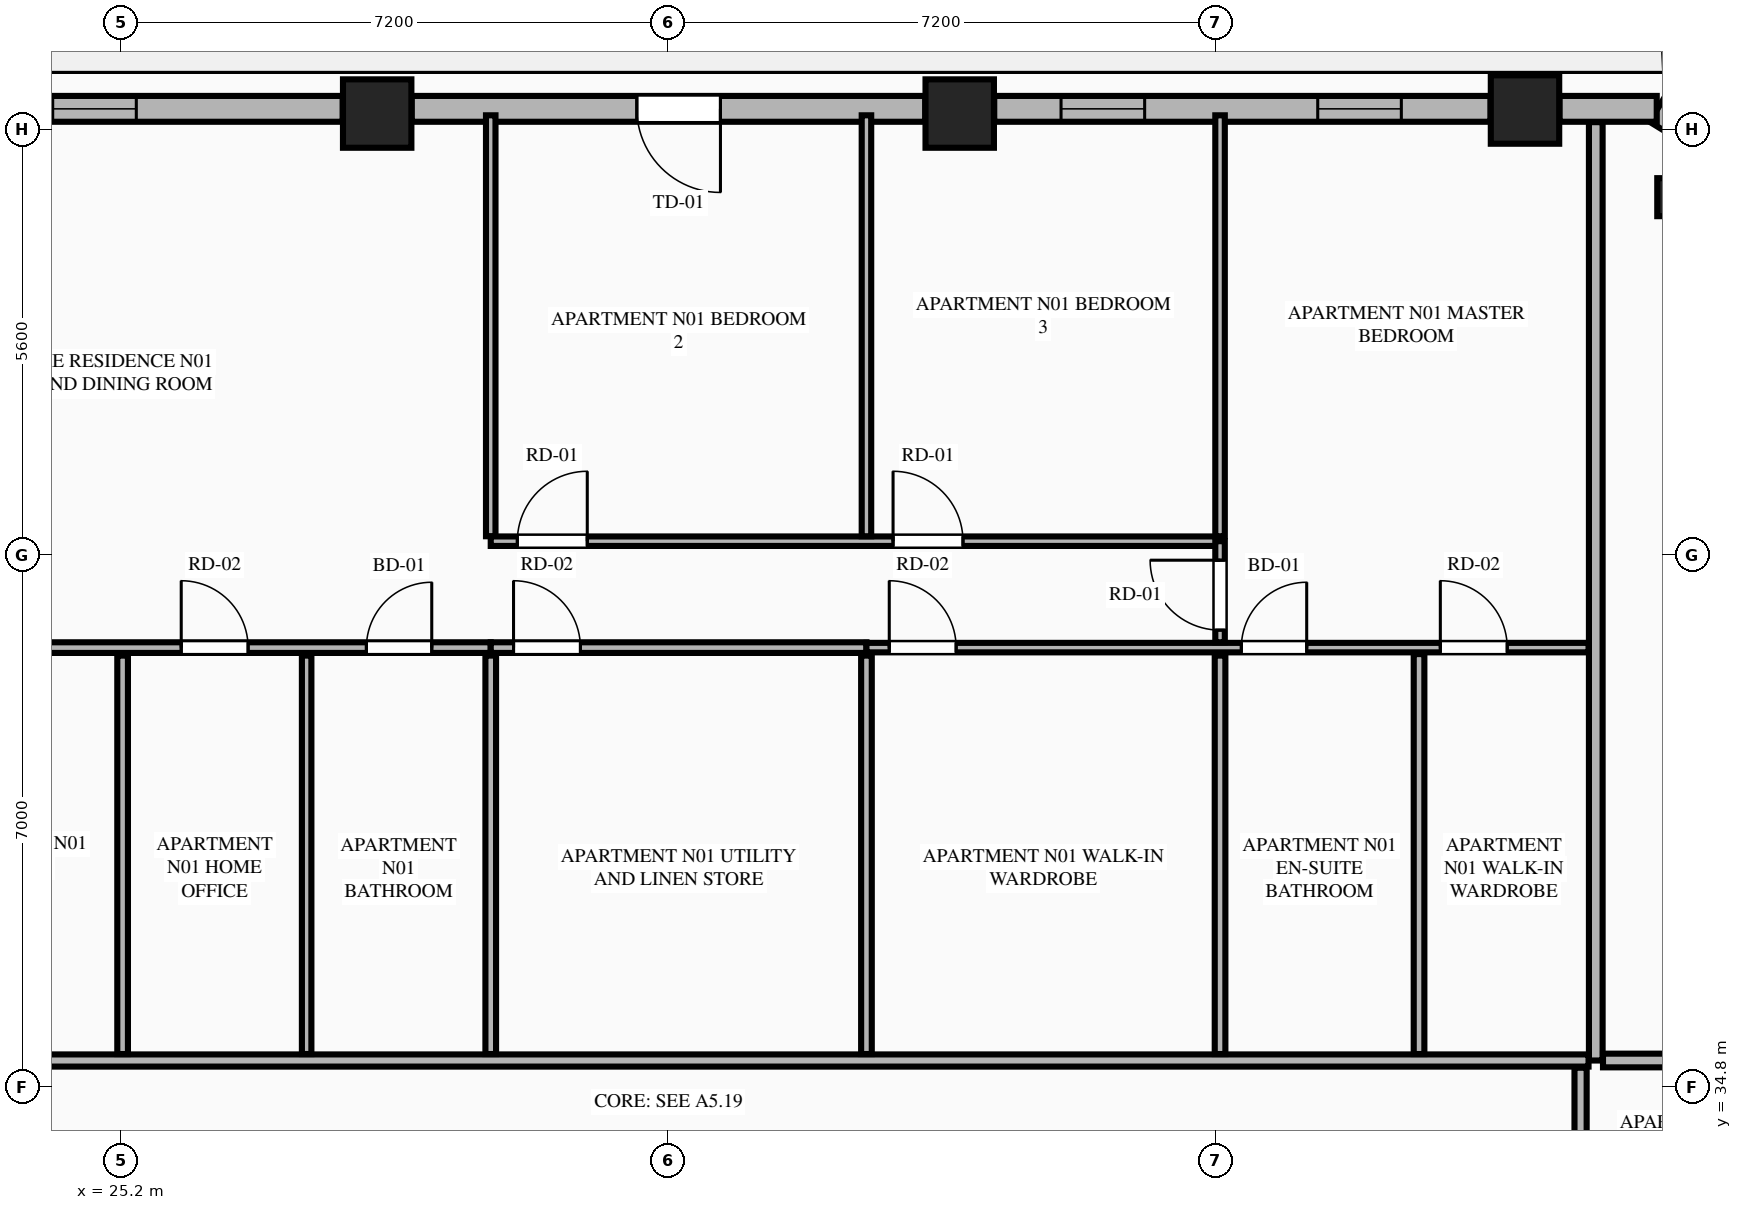
"""IFC4 building model, lengths in metres.
Left out: names, types, materials, properties, quantities, classifications, styles, units other than length and angle.
Written with IfcOpenShell. Run it as: python <this file> out.ifc"""

import sys

from ifc_helpers import new_model, si_unit, direction, frame, frame_2d, origin, origin_2d, place, context, subcontext, project, spatial, rectangle, extrude, element, fill, save


model = new_model("IFC4")
c1 = context("Model", 3, precision=1e-05, world=origin(), true_north=direction((0.0, 1.0)))
c2 = subcontext(c1, "Body", "Model", "MODEL_VIEW")
j1 = project(units=[si_unit("LENGTHUNIT", "METRE"), si_unit("PLANEANGLEUNIT", "RADIAN")], contexts=[c1])
p1 = place(None, origin())
s1 = spatial("IfcSite", under=j1, at=p1, CompositionType="ELEMENT")
p2 = place(p1, origin())
s2 = spatial("IfcBuilding", under=s1, at=p2, CompositionType="ELEMENT")
p3 = place(p2, frame((0.0, 0.0, 164.15)))
s3 = spatial("IfcBuildingStorey", under=s2, at=p3, CompositionType="ELEMENT", Elevation=164.15)
for number, where, z_axis, x_axis in (
    (1, (43.669, 47.661, 0.0), (0.0, 0.0, 1.0), (1.0, 0.0, 0.0)),
    (2, (36.232, 47.608, 0.0), (0.0, 0.0, 1.0), (1.0, 0.0, 0.0)),
    (3, (28.568, 47.608, 0.0), (0.0, 0.0, 1.0), (1.0, 0.0, 0.0)),
):
    element("IfcColumn", number, at=place(p3, frame(where, z_axis=z_axis, x_axis=x_axis)), inside=s3, PredefinedType="COLUMN", context=c2, shape_type="SweptSolid", body=[
        extrude(rectangle(XDim=0.9, YDim=0.9, at=origin_2d()), origin(), (0.0, 0.0, 1.0), 3.55),
    ])
p4 = place(p3, frame((45.659, 46.508, 0.0), z_axis=(0.0, 0.0, 1.0), x_axis=(-0.865160173452, 0.501495637342, 0.0)))
e4 = element("IfcColumn", 4, at=p4, inside=s3, PredefinedType="PILASTER", context=c2, shape_type="SweptSolid", body=[
    extrude(rectangle(XDim=0.5, YDim=0.35, at=origin_2d()), origin(), (0.0, 0.0, 1.0), 3.55),
])
p5 = place(p3, frame((46.971, 46.677, 0.0), z_axis=(0.0, 0.0, 1.0), x_axis=(-0.851798915137, 0.523868884523, 0.0)))
e5 = element("IfcWall", 5, at=p5, inside=s3, PredefinedType="STANDARD", context=c2, shape_type="SweptSolid", body=[
    extrude(rectangle(XDim=1.848, YDim=0.34, at=frame_2d((0.924, 0.0))), origin(), (0.0, 0.0, 1.0), 3.34),
])
p6 = place(p3, frame((45.402, 47.67, 0.0), z_axis=(0.0, 0.0, 1.0), x_axis=(-1.0, 0.0, 0.0)))
e6 = element("IfcWall", 6, at=p6, inside=s3, PredefinedType="STANDARD", context=c2, shape_type="SweptSolid", body=[
    extrude(rectangle(XDim=1.279, YDim=0.34, at=frame_2d((0.64, 0.0))), origin(), (0.0, 0.0, 1.0), 3.34),
])
p7 = place(p3, frame((43.215, 47.67, 0.0), z_axis=(0.0, 0.0, 1.0), x_axis=(-1.0, 0.0, 0.0)))
e7 = element("IfcWall", 7, at=p7, inside=s3, PredefinedType="STANDARD", context=c2, shape_type="SweptSolid", body=[
    extrude(rectangle(XDim=6.529, YDim=0.34, at=frame_2d((3.265, 0.0))), origin(), (0.0, 0.0, 1.0), 2.797),
])
p8 = place(p7, frame((1.173, 0.0, 0.75)))
e8 = element("IfcOpeningElement", 8, at=p8, cuts=e7, PredefinedType="OPENING", context=c2, shape_type="SweptSolid", body=[
    extrude(rectangle(XDim=1.1, YDim=1.897, at=frame_2d((0.55, 0.948))), frame((0.0, 0.18, 0.0), z_axis=(0.0, -1.0, 0.0), x_axis=(1.0, 0.0, 0.0)), (0.0, 0.0, 1.0), 0.36),
])
p9 = place(p7, frame((4.55, 0.0, 0.75)))
e9 = element("IfcOpeningElement", 9, at=p9, cuts=e7, PredefinedType="OPENING", context=c2, shape_type="SweptSolid", body=[
    extrude(rectangle(XDim=1.1, YDim=1.897, at=frame_2d((0.55, 0.948))), frame((0.0, 0.18, 0.0), z_axis=(0.0, -1.0, 0.0), x_axis=(1.0, 0.0, 0.0)), (0.0, 0.0, 1.0), 0.36),
])
p10 = place(p3, frame((35.778, 47.67, 0.0), z_axis=(0.0, 0.0, 1.0), x_axis=(-1.0, 0.0, 0.0)))
e10 = element("IfcWall", 10, at=p10, inside=s3, PredefinedType="STANDARD", context=c2, shape_type="SweptSolid", body=[
    extrude(rectangle(XDim=6.756, YDim=0.34, at=frame_2d((3.378, 0.0))), origin(), (0.0, 0.0, 1.0), 2.797),
])
p11 = place(p10, frame((2.694, 0.0, 0.0)))
e11 = element("IfcOpeningElement", 11, at=p11, cuts=e10, PredefinedType="OPENING", context=c2, shape_type="SweptSolid", body=[
    extrude(rectangle(XDim=1.1, YDim=2.25, at=frame_2d((0.55, 1.125))), frame((0.0, 0.18, 0.0), z_axis=(0.0, -1.0, 0.0), x_axis=(1.0, 0.0, 0.0)), (0.0, 0.0, 1.0), 0.36),
])
p12 = place(p3, frame((28.114, 47.67, 0.0), z_axis=(0.0, 0.0, 1.0), x_axis=(-1.0, 0.0, 0.0)))
e12 = element("IfcWall", 12, at=p12, inside=s3, PredefinedType="STANDARD", context=c2, shape_type="SweptSolid", body=[
    extrude(rectangle(XDim=6.529, YDim=0.34, at=frame_2d((3.265, 0.0))), origin(), (0.0, 0.0, 1.0), 2.797),
])
p13 = place(p12, frame((2.715, 0.0, 0.75)))
e13 = element("IfcOpeningElement", 13, at=p13, cuts=e12, PredefinedType="OPENING", context=c2, shape_type="SweptSolid", body=[
    extrude(rectangle(XDim=1.1, YDim=1.897, at=frame_2d((0.55, 0.948))), frame((0.0, 0.18, 0.0), z_axis=(0.0, -1.0, 0.0), x_axis=(1.0, 0.0, 0.0)), (0.0, 0.0, 1.0), 0.36),
])
p14 = place(p3, frame((44.6, 35.15, 0.0), z_axis=(0.0, 0.0, 1.0), x_axis=(0.0, 1.0, 0.0)))
e14 = element("IfcWall", 14, at=p14, inside=s3, PredefinedType="PARTITIONING", context=c2, shape_type="SweptSolid", body=[
    extrude(rectangle(XDim=12.345, YDim=0.18, at=frame_2d((6.173, 0.0))), origin(), (0.0, 0.0, 1.0), 3.34),
])
p15 = place(p3, frame((20.295, 35.15, 0.0), z_axis=(0.0, 0.0, 1.0), x_axis=(1.0, 0.0, 0.0)))
e15 = element("IfcWall", 15, at=p15, inside=s3, PredefinedType="PARTITIONING", context=c2, shape_type="SweptSolid", body=[
    extrude(rectangle(XDim=24.21, YDim=0.16, at=frame_2d((12.105, 0.0))), origin(), (0.0, 0.0, 1.0), 3.34),
])
p16 = place(p15, frame((0.405, 0.0, 0.0)))
e16 = element("IfcOpeningElement", 16, at=p16, cuts=e15, PredefinedType="OPENING", context=c2, shape_type="SweptSolid", body=[
    extrude(rectangle(XDim=1.35, YDim=2.35, at=frame_2d((0.675, 1.175))), frame((0.0, 0.09, 0.0), z_axis=(0.0, -1.0, 0.0), x_axis=(1.0, 0.0, 0.0)), (0.0, 0.0, 1.0), 0.18),
])
p17 = place(p3, frame((22.25, 40.582, 0.0), z_axis=(0.0, 0.0, 1.0), x_axis=(1.0, 0.0, 0.0)))
e17 = element("IfcWall", 17, at=p17, inside=s3, PredefinedType="PLUMBINGWALL", context=c2, shape_type="SweptSolid", body=[
    extrude(rectangle(XDim=7.812, YDim=0.14, at=frame_2d((3.906, 0.0))), origin(), (0.0, 0.0, 1.0), 3.34),
])
p18 = place(p17, frame((6.176, 0.0, 0.0)))
e18 = element("IfcOpeningElement", 18, at=p18, cuts=e17, PredefinedType="OPENING", context=c2, shape_type="SweptSolid", body=[
    extrude(rectangle(XDim=0.86, YDim=2.1, at=frame_2d((0.43, 1.05))), frame((0.0, 0.08, 0.0), z_axis=(0.0, -1.0, 0.0), x_axis=(1.0, 0.0, 0.0)), (0.0, 0.0, 1.0), 0.16),
])
p19 = place(p17, frame((0.26, 0.0, 0.0)))
e19 = element("IfcOpeningElement", 19, at=p19, cuts=e17, PredefinedType="OPENING", context=c2, shape_type="SweptSolid", body=[
    extrude(rectangle(XDim=0.88, YDim=2.15, at=frame_2d((0.44, 1.075))), frame((0.0, 0.08, 0.0), z_axis=(0.0, -1.0, 0.0), x_axis=(1.0, 0.0, 0.0)), (0.0, 0.0, 1.0), 0.16),
])
p20 = place(p17, frame((3.74, 0.0, 0.0)))
e20 = element("IfcOpeningElement", 20, at=p20, cuts=e17, PredefinedType="OPENING", context=c2, shape_type="SweptSolid", body=[
    extrude(rectangle(XDim=0.88, YDim=2.15, at=frame_2d((0.44, 1.075))), frame((0.0, 0.08, 0.0), z_axis=(0.0, -1.0, 0.0), x_axis=(1.0, 0.0, 0.0)), (0.0, 0.0, 1.0), 0.16),
])
p21 = place(p3, frame((30.062, 40.582, 0.0), z_axis=(0.0, 0.0, 1.0), x_axis=(1.0, 0.0, 0.0)))
e21 = element("IfcWall", 21, at=p21, inside=s3, PredefinedType="PLUMBINGWALL", context=c2, shape_type="SweptSolid", body=[
    extrude(rectangle(XDim=4.943, YDim=0.14, at=frame_2d((2.471, 0.0))), origin(), (0.0, 0.0, 1.0), 3.34),
])
p22 = place(p21, frame((0.3, 0.0, 0.0)))
e22 = element("IfcOpeningElement", 22, at=p22, cuts=e21, PredefinedType="OPENING", context=c2, shape_type="SweptSolid", body=[
    extrude(rectangle(XDim=0.88, YDim=2.15, at=frame_2d((0.44, 1.075))), frame((0.0, 0.08, 0.0), z_axis=(0.0, -1.0, 0.0), x_axis=(1.0, 0.0, 0.0)), (0.0, 0.0, 1.0), 0.16),
])
p23 = place(p3, frame((35.005, 40.582, 0.0), z_axis=(0.0, 0.0, 1.0), x_axis=(1.0, 0.0, 0.0)))
e23 = element("IfcWall", 23, at=p23, inside=s3, PredefinedType="PARTITIONING", context=c2, shape_type="SweptSolid", body=[
    extrude(rectangle(XDim=9.5, YDim=0.125, at=frame_2d((4.75, 0.0))), origin(), (0.0, 0.0, 1.0), 3.34),
])
p24 = place(p23, frame((4.932, 0.0, 0.0)))
e24 = element("IfcOpeningElement", 24, at=p24, cuts=e23, PredefinedType="OPENING", context=c2, shape_type="SweptSolid", body=[
    extrude(rectangle(XDim=0.86, YDim=2.1, at=frame_2d((0.43, 1.05))), frame((0.0, 0.073, 0.0), z_axis=(0.0, -1.0, 0.0), x_axis=(1.0, 0.0, 0.0)), (0.0, 0.0, 1.0), 0.145),
])
p25 = place(p23, frame((7.55, 0.0, 0.0)))
e25 = element("IfcOpeningElement", 25, at=p25, cuts=e23, PredefinedType="OPENING", context=c2, shape_type="SweptSolid", body=[
    extrude(rectangle(XDim=0.88, YDim=2.15, at=frame_2d((0.44, 1.075))), frame((0.0, 0.073, 0.0), z_axis=(0.0, -1.0, 0.0), x_axis=(1.0, 0.0, 0.0)), (0.0, 0.0, 1.0), 0.145),
])
p26 = place(p23, frame((0.3, 0.0, 0.0)))
e26 = element("IfcOpeningElement", 26, at=p26, cuts=e23, PredefinedType="OPENING", context=c2, shape_type="SweptSolid", body=[
    extrude(rectangle(XDim=0.88, YDim=2.15, at=frame_2d((0.44, 1.075))), frame((0.0, 0.073, 0.0), z_axis=(0.0, -1.0, 0.0), x_axis=(1.0, 0.0, 0.0)), (0.0, 0.0, 1.0), 0.145),
])
p27 = place(p3, frame((25.219, 35.235, 0.0), z_axis=(0.0, 0.0, 1.0), x_axis=(0.0, 1.0, 0.0)))
e27 = element("IfcWall", 27, at=p27, inside=s3, PredefinedType="PLUMBINGWALL", context=c2, shape_type="SweptSolid", body=[
    extrude(rectangle(XDim=5.242, YDim=0.14, at=frame_2d((2.621, 0.0))), origin(), (0.0, 0.0, 1.0), 3.34),
])
p28 = place(p3, frame((27.64, 35.235, 0.0), z_axis=(0.0, 0.0, 1.0), x_axis=(0.0, 1.0, 0.0)))
e28 = element("IfcWall", 28, at=p28, inside=s3, PredefinedType="PARTITIONING", context=c2, shape_type="SweptSolid", body=[
    extrude(rectangle(XDim=5.242, YDim=0.125, at=frame_2d((2.621, 0.0))), origin(), (0.0, 0.0, 1.0), 3.34),
])
p29 = place(p3, frame((30.062, 42.047, 0.0), z_axis=(0.0, 0.0, 1.0), x_axis=(0.0, 1.0, 0.0)))
e29 = element("IfcWall", 29, at=p29, inside=s3, PredefinedType="PARTITIONING", context=c2, shape_type="SweptSolid", body=[
    extrude(rectangle(XDim=5.538, YDim=0.125, at=frame_2d((2.769, 0.0))), origin(), (0.0, 0.0, 1.0), 3.34),
])
p30 = place(p3, frame((30.062, 41.982, 0.0), z_axis=(0.0, 0.0, 1.0), x_axis=(1.0, 0.0, 0.0)))
e30 = element("IfcWall", 30, at=p30, inside=s3, PredefinedType="PARTITIONING", context=c2, shape_type="SweptSolid", body=[
    extrude(rectangle(XDim=9.595, YDim=0.125, at=frame_2d((4.797, 0.0))), origin(), (0.0, 0.0, 1.0), 3.34),
])
p31 = place(p30, frame((0.35, 0.0, 0.0)))
e31 = element("IfcOpeningElement", 31, at=p31, cuts=e30, PredefinedType="OPENING", context=c2, shape_type="SweptSolid", body=[
    extrude(rectangle(XDim=0.92, YDim=2.15, at=frame_2d((0.46, 1.075))), frame((0.0, 0.073, 0.0), z_axis=(0.0, -1.0, 0.0), x_axis=(1.0, 0.0, 0.0)), (0.0, 0.0, 1.0), 0.145),
])
p32 = place(p30, frame((5.293, 0.0, 0.0)))
e32 = element("IfcOpeningElement", 32, at=p32, cuts=e30, PredefinedType="OPENING", context=c2, shape_type="SweptSolid", body=[
    extrude(rectangle(XDim=0.92, YDim=2.15, at=frame_2d((0.46, 1.075))), frame((0.0, 0.073, 0.0), z_axis=(0.0, -1.0, 0.0), x_axis=(1.0, 0.0, 0.0)), (0.0, 0.0, 1.0), 0.145),
])
p33 = place(p3, frame((39.657, 40.652, 0.0), z_axis=(0.0, 0.0, 1.0), x_axis=(0.0, 1.0, 0.0)))
e33 = element("IfcWall", 33, at=p33, inside=s3, PredefinedType="PARTITIONING", context=c2, shape_type="SweptSolid", body=[
    extrude(rectangle(XDim=1.33, YDim=0.125, at=frame_2d((0.665, 0.0))), origin(), (0.0, 0.0, 1.0), 3.34),
])
p34 = place(p33, frame((0.16, 0.0, 0.0)))
e34 = element("IfcOpeningElement", 34, at=p34, cuts=e33, PredefinedType="OPENING", context=c2, shape_type="SweptSolid", body=[
    extrude(rectangle(XDim=0.92, YDim=2.15, at=frame_2d((0.46, 1.075))), frame((0.0, 0.073, 0.0), z_axis=(0.0, -1.0, 0.0), x_axis=(1.0, 0.0, 0.0)), (0.0, 0.0, 1.0), 0.145),
])
for number, where, z_axis, x_axis in (
    (35, (30.062, 35.235, 0.0), (0.0, 0.0, 1.0), (0.0, 1.0, 0.0)),
    (36, (35.005, 35.235, 0.0), (0.0, 0.0, 1.0), (0.0, 1.0, 0.0)),
):
    element("IfcWall", number, at=place(p3, frame(where, z_axis=z_axis, x_axis=x_axis)), inside=s3, PredefinedType="PLUMBINGWALL", context=c2, shape_type="SweptSolid", body=[
        extrude(rectangle(XDim=5.242, YDim=0.14, at=frame_2d((2.621, 0.0))), origin(), (0.0, 0.0, 1.0), 3.34),
    ])
for number, where, z_axis, x_axis in (
    (37, (35.005, 42.047, 0.0), (0.0, 0.0, 1.0), (0.0, 1.0, 0.0)),
    (38, (39.657, 42.047, 0.0), (0.0, 0.0, 1.0), (0.0, 1.0, 0.0)),
):
    element("IfcWall", number, at=place(p3, frame(where, z_axis=z_axis, x_axis=x_axis)), inside=s3, PredefinedType="PARTITIONING", context=c2, shape_type="SweptSolid", body=[
        extrude(rectangle(XDim=5.538, YDim=0.125, at=frame_2d((2.769, 0.0))), origin(), (0.0, 0.0, 1.0), 3.34),
    ])
p35 = place(p3, frame((39.657, 35.235, 0.0), z_axis=(0.0, 0.0, 1.0), x_axis=(0.0, 1.0, 0.0)))
e39 = element("IfcWall", 39, at=p35, inside=s3, PredefinedType="PLUMBINGWALL", context=c2, shape_type="SweptSolid", body=[
    extrude(rectangle(XDim=5.242, YDim=0.14, at=frame_2d((2.621, 0.0))), origin(), (0.0, 0.0, 1.0), 3.34),
])
p36 = place(p3, frame((42.275, 35.235, 0.0), z_axis=(0.0, 0.0, 1.0), x_axis=(0.0, 1.0, 0.0)))
e40 = element("IfcWall", 40, at=p36, inside=s3, PredefinedType="PLUMBINGWALL", context=c2, shape_type="SweptSolid", body=[
    extrude(rectangle(XDim=5.262, YDim=0.14, at=frame_2d((2.631, 0.0))), origin(), (0.0, 0.0, 1.0), 2.722),
])
p37 = place(p3, frame((44.695, 35.15, 0.0), z_axis=(0.0, 0.0, 1.0), x_axis=(1.0, 0.0, 0.0)))
e41 = element("IfcWall", 41, at=p37, inside=s3, PredefinedType="PARTITIONING", context=c2, shape_type="SweptSolid", body=[
    extrude(rectangle(XDim=7.895, YDim=0.18, at=frame_2d((3.948, 0.0))), origin(), (0.0, 0.0, 1.0), 3.34),
])
p38 = place(p3, frame((44.4, 16.745, 0.0), z_axis=(0.0, 0.0, 1.0), x_axis=(0.0, 1.0, 0.0)))
e42 = element("IfcWall", 42, at=p38, inside=s3, PredefinedType="PARTITIONING", context=c2, shape_type="SweptSolid", body=[
    extrude(rectangle(XDim=18.31, YDim=0.16, at=frame_2d((9.155, 0.0))), origin(), (0.0, 0.0, 1.0), 3.34),
])
p39 = place(p38, frame((0.45, 0.0, 0.0)))
e43 = element("IfcOpeningElement", 43, at=p39, cuts=e42, PredefinedType="OPENING", context=c2, shape_type="SweptSolid", body=[
    extrude(rectangle(XDim=1.02, YDim=2.25, at=frame_2d((0.51, 1.125))), frame((0.0, 0.09, 0.0), z_axis=(0.0, -1.0, 0.0), x_axis=(1.0, 0.0, 0.0)), (0.0, 0.0, 1.0), 0.18),
])
p40 = place(p8, origin())
e44 = element("IfcWindow", 44, at=p40, inside=s3, PartitioningType="SINGLE_PANEL", PredefinedType="WINDOW", context=c2, shape_type="SweptSolid", body=[
    extrude(rectangle(XDim=1.1, YDim=1.897, at=frame_2d((0.55, 0.948))), frame((0.0, 0.03, 0.0), z_axis=(0.0, -1.0, 0.0), x_axis=(1.0, 0.0, 0.0)), (0.0, 0.0, 1.0), 0.06),
])
fill(e8, e44)
p41 = place(p11, origin())
e45 = element("IfcDoor", 45, at=p41, inside=s3, OperationType="SINGLE_SWING_LEFT", PredefinedType="DOOR", context=c2, shape_type="SweptSolid", body=[
    extrude(rectangle(XDim=1.1, YDim=2.25, at=frame_2d((0.55, 1.125))), frame((0.0, 0.025, 0.0), z_axis=(0.0, -1.0, 0.0), x_axis=(1.0, 0.0, 0.0)), (0.0, 0.0, 1.0), 0.05),
])
fill(e11, e45)
p42 = place(p13, origin())
e46 = element("IfcWindow", 46, at=p42, inside=s3, PartitioningType="SINGLE_PANEL", PredefinedType="WINDOW", context=c2, shape_type="SweptSolid", body=[
    extrude(rectangle(XDim=1.1, YDim=1.897, at=frame_2d((0.55, 0.948))), frame((0.0, 0.03, 0.0), z_axis=(0.0, -1.0, 0.0), x_axis=(1.0, 0.0, 0.0)), (0.0, 0.0, 1.0), 0.06),
])
fill(e13, e46)
p43 = place(p18, origin())
e47 = element("IfcDoor", 47, at=p43, inside=s3, OperationType="SINGLE_SWING_RIGHT", PredefinedType="DOOR", context=c2, shape_type="SweptSolid", body=[
    extrude(rectangle(XDim=0.86, YDim=2.1, at=frame_2d((0.43, 1.05))), frame((0.0, 0.025, 0.0), z_axis=(0.0, -1.0, 0.0), x_axis=(1.0, 0.0, 0.0)), (0.0, 0.0, 1.0), 0.05),
])
fill(e18, e47)
p44 = place(p24, origin())
e48 = element("IfcDoor", 48, at=p44, inside=s3, OperationType="SINGLE_SWING_RIGHT", PredefinedType="DOOR", context=c2, shape_type="SweptSolid", body=[
    extrude(rectangle(XDim=0.86, YDim=2.1, at=frame_2d((0.43, 1.05))), frame((0.0, 0.025, 0.0), z_axis=(0.0, -1.0, 0.0), x_axis=(1.0, 0.0, 0.0)), (0.0, 0.0, 1.0), 0.05),
])
fill(e24, e48)
p45 = place(p25, origin())
e49 = element("IfcDoor", 49, at=p45, inside=s3, OperationType="SINGLE_SWING_LEFT", PredefinedType="DOOR", context=c2, shape_type="SweptSolid", body=[
    extrude(rectangle(XDim=0.88, YDim=2.15, at=frame_2d((0.44, 1.075))), frame((0.0, 0.025, 0.0), z_axis=(0.0, -1.0, 0.0), x_axis=(1.0, 0.0, 0.0)), (0.0, 0.0, 1.0), 0.05),
])
fill(e25, e49)
p46 = place(p20, origin())
e50 = element("IfcDoor", 50, at=p46, inside=s3, OperationType="SINGLE_SWING_LEFT", PredefinedType="DOOR", context=c2, shape_type="SweptSolid", body=[
    extrude(rectangle(XDim=0.88, YDim=2.15, at=frame_2d((0.44, 1.075))), frame((0.0, 0.025, 0.0), z_axis=(0.0, -1.0, 0.0), x_axis=(1.0, 0.0, 0.0)), (0.0, 0.0, 1.0), 0.05),
])
fill(e20, e50)
p47 = place(p22, origin())
e51 = element("IfcDoor", 51, at=p47, inside=s3, OperationType="SINGLE_SWING_LEFT", PredefinedType="DOOR", context=c2, shape_type="SweptSolid", body=[
    extrude(rectangle(XDim=0.88, YDim=2.15, at=frame_2d((0.44, 1.075))), frame((0.0, 0.025, 0.0), z_axis=(0.0, -1.0, 0.0), x_axis=(1.0, 0.0, 0.0)), (0.0, 0.0, 1.0), 0.05),
])
fill(e22, e51)
p48 = place(p31, origin())
e52 = element("IfcDoor", 52, at=p48, inside=s3, OperationType="SINGLE_SWING_RIGHT", PredefinedType="DOOR", context=c2, shape_type="SweptSolid", body=[
    extrude(rectangle(XDim=0.92, YDim=2.15, at=frame_2d((0.46, 1.075))), frame((0.0, 0.025, 0.0), z_axis=(0.0, -1.0, 0.0), x_axis=(1.0, 0.0, 0.0)), (0.0, 0.0, 1.0), 0.05),
])
fill(e31, e52)
p49 = place(p32, origin())
e53 = element("IfcDoor", 53, at=p49, inside=s3, OperationType="SINGLE_SWING_LEFT", PredefinedType="DOOR", context=c2, shape_type="SweptSolid", body=[
    extrude(rectangle(XDim=0.92, YDim=2.15, at=frame_2d((0.46, 1.075))), frame((0.0, 0.025, 0.0), z_axis=(0.0, -1.0, 0.0), x_axis=(1.0, 0.0, 0.0)), (0.0, 0.0, 1.0), 0.05),
])
fill(e32, e53)
p50 = place(p34, origin())
e54 = element("IfcDoor", 54, at=p50, inside=s3, OperationType="SINGLE_SWING_RIGHT", PredefinedType="DOOR", context=c2, shape_type="SweptSolid", body=[
    extrude(rectangle(XDim=0.92, YDim=2.15, at=frame_2d((0.46, 1.075))), frame((0.0, 0.025, 0.0), z_axis=(0.0, -1.0, 0.0), x_axis=(1.0, 0.0, 0.0)), (0.0, 0.0, 1.0), 0.05),
])
fill(e34, e54)
p51 = place(p26, origin())
e55 = element("IfcDoor", 55, at=p51, inside=s3, OperationType="SINGLE_SWING_LEFT", PredefinedType="DOOR", context=c2, shape_type="SweptSolid", body=[
    extrude(rectangle(XDim=0.88, YDim=2.15, at=frame_2d((0.44, 1.075))), frame((0.0, 0.025, 0.0), z_axis=(0.0, -1.0, 0.0), x_axis=(1.0, 0.0, 0.0)), (0.0, 0.0, 1.0), 0.05),
])
fill(e26, e55)
p52 = place(p9, origin())
e56 = element("IfcWindow", 56, at=p52, inside=s3, PartitioningType="SINGLE_PANEL", PredefinedType="WINDOW", context=c2, shape_type="SweptSolid", body=[
    extrude(rectangle(XDim=1.1, YDim=1.897, at=frame_2d((0.55, 0.948))), frame((0.0, 0.03, 0.0), z_axis=(0.0, -1.0, 0.0), x_axis=(1.0, 0.0, 0.0)), (0.0, 0.0, 1.0), 0.06),
])
fill(e9, e56)
save(model, sys.argv[1])
